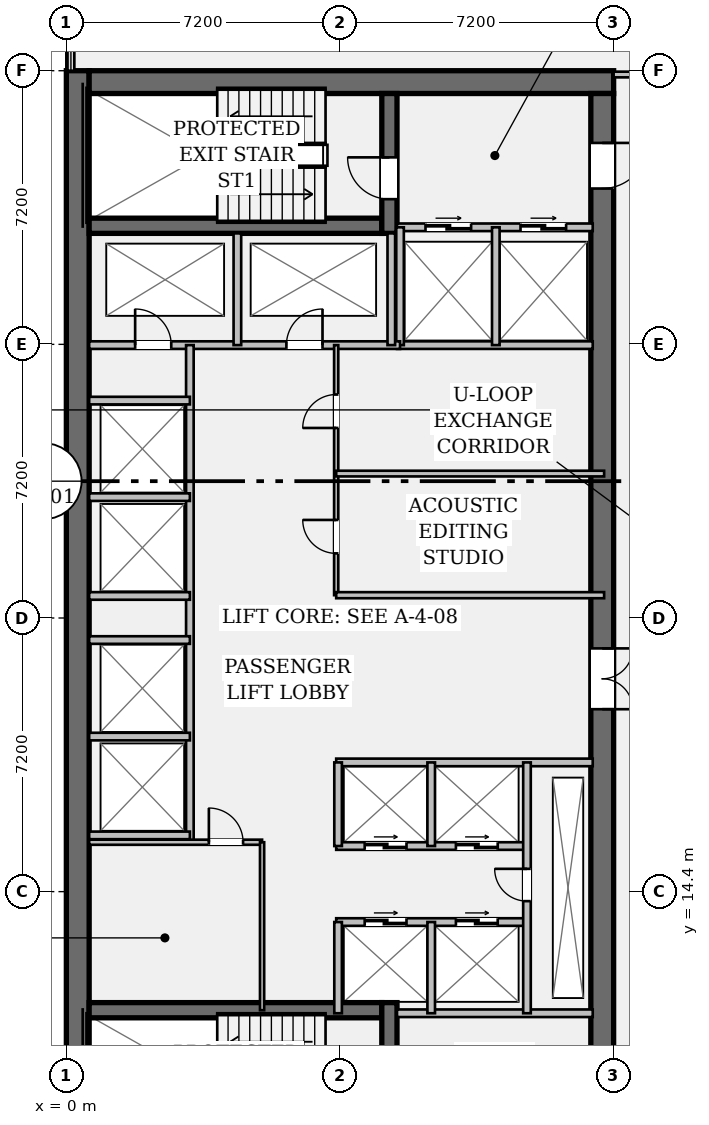
"""IFC4 building model, lengths in metres.
Left out: names, types, materials, properties, quantities, classifications, styles, units other than length and angle.
Written with IfcOpenShell. Run it as: python <this file> out.ifc"""

import sys

from ifc_helpers import new_model, si_unit, direction, frame, frame_2d, origin, place, context, subcontext, project, spatial, rectangle, extrude, element, fill, save


model = new_model("IFC4")
c1 = context("Model", 3, precision=1e-05, world=origin(), true_north=direction((0.0, 1.0)))
c2 = subcontext(c1, "Body", "Model", "MODEL_VIEW")
j1 = project(units=[si_unit("LENGTHUNIT", "METRE"), si_unit("PLANEANGLEUNIT", "RADIAN")], contexts=[c1])
p1 = place(None, origin())
s1 = spatial("IfcSite", under=j1, at=p1, CompositionType="ELEMENT")
p2 = place(p1, origin())
s2 = spatial("IfcBuilding", under=s1, at=p2, CompositionType="ELEMENT")
p3 = place(p2, frame((0.0, 0.0, 121.45)))
s3 = spatial("IfcBuildingStorey", under=s2, at=p3, CompositionType="ELEMENT", Elevation=121.45)
p4 = place(p3, frame((0.3, 7.2, 0.0), z_axis=(0.0, 0.0, 1.0), x_axis=(0.0, 1.0, 0.0)))
e1 = element("IfcWall", 1, at=p4, inside=s3, PredefinedType="SHEAR", context=c2, shape_type="SweptSolid", body=[
    extrude(rectangle(XDim=28.8, YDim=0.6, at=frame_2d((14.4, 0.0))), origin(), (0.0, 0.0, 1.0), 3.58),
])
p5 = place(p3, frame((0.6, 35.7, 0.0), z_axis=(0.0, 0.0, 1.0), x_axis=(1.0, 0.0, 0.0)))
e2 = element("IfcWall", 2, at=p5, inside=s3, PredefinedType="SHEAR", context=c2, shape_type="SweptSolid", body=[
    extrude(rectangle(XDim=13.8, YDim=0.6, at=frame_2d((6.9, 0.0))), origin(), (0.0, 0.0, 1.0), 3.58),
])
p6 = place(p3, frame((14.1, 35.4, 0.0), z_axis=(0.0, 0.0, 1.0), x_axis=(0.0, -1.0, 0.0)))
e3 = element("IfcWall", 3, at=p6, inside=s3, PredefinedType="SHEAR", context=c2, shape_type="SweptSolid", body=[
    extrude(rectangle(XDim=27.6, YDim=0.6, at=frame_2d((13.8, 0.0))), origin(), (0.0, 0.0, 1.0), 3.58),
])
p7 = place(p6, frame((1.3, 0.0, 0.0)))
e4 = element("IfcOpeningElement", 4, at=p7, cuts=e3, PredefinedType="OPENING", context=c2, shape_type="SweptSolid", body=[
    extrude(rectangle(XDim=1.2, YDim=2.15, at=frame_2d((0.6, 1.075))), frame((0.0, 0.312, 0.0), z_axis=(0.0, -1.0, 0.0), x_axis=(1.0, 0.0, 0.0)), (0.0, 0.0, 1.0), 0.624),
])
p8 = place(p6, frame((25.25, 0.0, 0.0)))
e5 = element("IfcOpeningElement", 5, at=p8, cuts=e3, PredefinedType="OPENING", context=c2, shape_type="SweptSolid", body=[
    extrude(rectangle(XDim=1.2, YDim=2.15, at=frame_2d((0.6, 1.075))), frame((0.0, 0.312, 0.0), z_axis=(0.0, -1.0, 0.0), x_axis=(1.0, 0.0, 0.0)), (0.0, 0.0, 1.0), 0.624),
])
p9 = place(p6, frame((14.6, 0.0, 0.0)))
e6 = element("IfcOpeningElement", 6, at=p9, cuts=e3, PredefinedType="OPENING", context=c2, shape_type="SweptSolid", body=[
    extrude(rectangle(XDim=1.6, YDim=2.2, at=frame_2d((0.8, 1.1))), frame((0.0, 0.312, 0.0), z_axis=(0.0, -1.0, 0.0), x_axis=(1.0, 0.0, 0.0)), (0.0, 0.0, 1.0), 0.624),
])
for number, where, z_axis, x_axis in (
    (7, (0.6, 31.92, 0.0), (0.0, 0.0, 1.0), (1.0, 0.0, 0.0)),
    (8, (0.6, 11.28, 0.0), (0.0, 0.0, 1.0), (1.0, 0.0, 0.0)),
):
    element("IfcWall", number, at=place(p3, frame(where, z_axis=z_axis, x_axis=x_axis)), inside=s3, PredefinedType="SHEAR", context=c2, shape_type="SweptSolid", body=[
        extrude(rectangle(XDim=7.7, YDim=0.4, at=frame_2d((3.85, 0.0))), origin(), (0.0, 0.0, 1.0), 3.58),
    ])
p10 = place(p3, frame((8.5, 31.72, 0.0), z_axis=(0.0, 0.0, 1.0), x_axis=(0.0, 1.0, 0.0)))
e9 = element("IfcWall", 9, at=p10, inside=s3, PredefinedType="SHEAR", context=c2, shape_type="SweptSolid", body=[
    extrude(rectangle(XDim=3.68, YDim=0.4, at=frame_2d((1.84, 0.0))), origin(), (0.0, 0.0, 1.0), 3.58),
])
p11 = place(p10, frame((0.9, 0.0, 0.0)))
e10 = element("IfcOpeningElement", 10, at=p11, cuts=e9, PredefinedType="OPENING", context=c2, shape_type="SweptSolid", body=[
    extrude(rectangle(XDim=1.1, YDim=2.15, at=frame_2d((0.55, 1.075))), frame((0.0, 0.212, 0.0), z_axis=(0.0, -1.0, 0.0), x_axis=(1.0, 0.0, 0.0)), (0.0, 0.0, 1.0), 0.424),
])
p12 = place(p3, frame((8.5, 7.8, 0.0), z_axis=(0.0, 0.0, 1.0), x_axis=(0.0, 1.0, 0.0)))
e11 = element("IfcWall", 11, at=p12, inside=s3, PredefinedType="SHEAR", context=c2, shape_type="SweptSolid", body=[
    extrude(rectangle(XDim=3.68, YDim=0.4, at=frame_2d((1.84, 0.0))), origin(), (0.0, 0.0, 1.0), 3.58),
])
p13 = place(p12, frame((0.85, 0.0, 0.0)))
e12 = element("IfcOpeningElement", 12, at=p13, cuts=e11, PredefinedType="OPENING", context=c2, shape_type="SweptSolid", body=[
    extrude(rectangle(XDim=1.1, YDim=2.15, at=frame_2d((0.55, 1.075))), frame((0.0, 0.212, 0.0), z_axis=(0.0, -1.0, 0.0), x_axis=(1.0, 0.0, 0.0)), (0.0, 0.0, 1.0), 0.424),
])
p14 = place(p3, frame((8.7, 31.88, 0.0), z_axis=(0.0, 0.0, 1.0), x_axis=(1.0, 0.0, 0.0)))
e13 = element("IfcWall", 13, at=p14, inside=s3, PredefinedType="PARTITIONING", context=c2, shape_type="SweptSolid", body=[
    extrude(rectangle(XDim=5.15, YDim=0.2, at=frame_2d((2.575, 0.0))), origin(), (0.0, 0.0, 1.0), 3.58),
])
p15 = place(p14, frame((0.75, 0.0, 0.0)))
e14 = element("IfcOpeningElement", 14, at=p15, cuts=e13, PredefinedType="OPENING", context=c2, shape_type="SweptSolid", body=[
    extrude(rectangle(XDim=1.2, YDim=2.2, at=frame_2d((0.6, 1.1))), frame((0.0, 0.112, 0.0), z_axis=(0.0, -1.0, 0.0), x_axis=(1.0, 0.0, 0.0)), (0.0, 0.0, 1.0), 0.224),
])
p16 = place(p14, frame((3.25, 0.0, 0.0)))
e15 = element("IfcOpeningElement", 15, at=p16, cuts=e13, PredefinedType="OPENING", context=c2, shape_type="SweptSolid", body=[
    extrude(rectangle(XDim=1.2, YDim=2.2, at=frame_2d((0.6, 1.1))), frame((0.0, 0.112, 0.0), z_axis=(0.0, -1.0, 0.0), x_axis=(1.0, 0.0, 0.0)), (0.0, 0.0, 1.0), 0.224),
])
for number, where, z_axis, x_axis in (
    (16, (8.7, 11.2, 0.0), (0.0, 0.0, 1.0), (1.0, 0.0, 0.0)),
    (17, (8.7, 28.78, 0.0), (0.0, 0.0, 1.0), (1.0, 0.0, 0.0)),
):
    element("IfcWall", number, at=place(p3, frame(where, z_axis=z_axis, x_axis=x_axis)), inside=s3, PredefinedType="PARTITIONING", context=c2, shape_type="SweptSolid", body=[
        extrude(rectangle(XDim=5.15, YDim=0.2, at=frame_2d((2.575, 0.0))), origin(), (0.0, 0.0, 1.0), 3.58),
    ])
for number, where, z_axis, x_axis in (
    (18, (8.78, 28.78, 0.0), (0.0, 0.0, 1.0), (0.0, 1.0, 0.0)),
    (19, (11.3, 28.78, 0.0), (0.0, 0.0, 1.0), (0.0, 1.0, 0.0)),
):
    element("IfcWall", number, at=place(p3, frame(where, z_axis=z_axis, x_axis=x_axis)), inside=s3, PredefinedType="PARTITIONING", context=c2, shape_type="SweptSolid", body=[
        extrude(rectangle(XDim=3.1, YDim=0.2, at=frame_2d((1.55, 0.0))), origin(), (0.0, 0.0, 1.0), 3.58),
    ])
p17 = place(p3, frame((0.6, 28.78, 0.0), z_axis=(0.0, 0.0, 1.0), x_axis=(1.0, 0.0, 0.0)))
e20 = element("IfcWall", 20, at=p17, inside=s3, PredefinedType="PARTITIONING", context=c2, shape_type="SweptSolid", body=[
    extrude(rectangle(XDim=8.18, YDim=0.2, at=frame_2d((4.09, 0.0))), origin(), (0.0, 0.0, 1.0), 3.58),
])
p18 = place(p17, frame((1.21, 0.0, 0.0)))
e21 = element("IfcOpeningElement", 21, at=p18, cuts=e20, PredefinedType="OPENING", context=c2, shape_type="SweptSolid", body=[
    extrude(rectangle(XDim=0.95, YDim=2.15, at=frame_2d((0.475, 1.075))), frame((0.0, 0.112, 0.0), z_axis=(0.0, -1.0, 0.0), x_axis=(1.0, 0.0, 0.0)), (0.0, 0.0, 1.0), 0.224),
])
p19 = place(p17, frame((5.19, 0.0, 0.0)))
e22 = element("IfcOpeningElement", 22, at=p19, cuts=e20, PredefinedType="OPENING", context=c2, shape_type="SweptSolid", body=[
    extrude(rectangle(XDim=0.95, YDim=2.15, at=frame_2d((0.475, 1.075))), frame((0.0, 0.112, 0.0), z_axis=(0.0, -1.0, 0.0), x_axis=(1.0, 0.0, 0.0)), (0.0, 0.0, 1.0), 0.224),
])
for number, where, z_axis, x_axis in (
    (23, (4.5, 28.78, 0.0), (0.0, 0.0, 1.0), (0.0, 1.0, 0.0)),
    (24, (8.55, 28.78, 0.0), (0.0, 0.0, 1.0), (0.0, 1.0, 0.0)),
):
    element("IfcWall", number, at=place(p3, frame(where, z_axis=z_axis, x_axis=x_axis)), inside=s3, PredefinedType="PARTITIONING", context=c2, shape_type="SweptSolid", body=[
        extrude(rectangle(XDim=2.94, YDim=0.2, at=frame_2d((1.47, 0.0))), origin(), (0.0, 0.0, 1.0), 3.58),
    ])
p20 = place(p3, frame((3.25, 15.7, 0.0), z_axis=(0.0, 0.0, 1.0), x_axis=(0.0, 1.0, 0.0)))
e25 = element("IfcWall", 25, at=p20, inside=s3, PredefinedType="PARTITIONING", context=c2, shape_type="SweptSolid", body=[
    extrude(rectangle(XDim=13.08, YDim=0.2, at=frame_2d((6.54, 0.0))), origin(), (0.0, 0.0, 1.0), 3.58),
])
for number, where, z_axis, x_axis in (
    (26, (0.6, 15.88, 0.0), (0.0, 0.0, 1.0), (1.0, 0.0, 0.0)),
    (27, (0.6, 18.48, 0.0), (0.0, 0.0, 1.0), (1.0, 0.0, 0.0)),
    (28, (0.6, 22.18, 0.0), (0.0, 0.0, 1.0), (1.0, 0.0, 0.0)),
    (29, (0.6, 24.78, 0.0), (0.0, 0.0, 1.0), (1.0, 0.0, 0.0)),
    (30, (0.6, 21.02, 0.0), (0.0, 0.0, 1.0), (1.0, 0.0, 0.0)),
    (31, (0.6, 27.32, 0.0), (0.0, 0.0, 1.0), (1.0, 0.0, 0.0)),
):
    element("IfcWall", number, at=place(p3, frame(where, z_axis=z_axis, x_axis=x_axis)), inside=s3, PredefinedType="PARTITIONING", context=c2, shape_type="SweptSolid", body=[
        extrude(rectangle(XDim=2.65, YDim=0.2, at=frame_2d((1.325, 0.0))), origin(), (0.0, 0.0, 1.0), 3.58),
    ])
p21 = place(p3, frame((7.1, 22.2, 0.0), z_axis=(0.0, 0.0, 1.0), x_axis=(0.0, 1.0, 0.0)))
e32 = element("IfcWall", 32, at=p21, inside=s3, PredefinedType="PARTITIONING", context=c2, shape_type="SweptSolid", body=[
    extrude(rectangle(XDim=6.58, YDim=0.11, at=frame_2d((3.29, 0.0))), origin(), (0.0, 0.0, 1.0), 3.58),
])
p22 = place(p21, frame((1.1, 0.0, 0.0)))
e33 = element("IfcOpeningElement", 33, at=p22, cuts=e32, PredefinedType="OPENING", context=c2, shape_type="SweptSolid", body=[
    extrude(rectangle(XDim=0.88, YDim=2.15, at=frame_2d((0.44, 1.075))), frame((0.0, 0.067, 0.0), z_axis=(0.0, -1.0, 0.0), x_axis=(1.0, 0.0, 0.0)), (0.0, 0.0, 1.0), 0.134),
])
p23 = place(p21, frame((4.4, 0.0, 0.0)))
e34 = element("IfcOpeningElement", 34, at=p23, cuts=e32, PredefinedType="OPENING", context=c2, shape_type="SweptSolid", body=[
    extrude(rectangle(XDim=0.88, YDim=2.15, at=frame_2d((0.44, 1.075))), frame((0.0, 0.067, 0.0), z_axis=(0.0, -1.0, 0.0), x_axis=(1.0, 0.0, 0.0)), (0.0, 0.0, 1.0), 0.134),
])
p24 = place(p3, frame((7.1, 22.2, 0.0), z_axis=(0.0, 0.0, 1.0), x_axis=(1.0, 0.0, 0.0)))
e35 = element("IfcWall", 35, at=p24, inside=s3, PredefinedType="PARTITIONING", context=c2, shape_type="SweptSolid", body=[
    extrude(rectangle(XDim=7.05, YDim=0.16, at=frame_2d((3.525, 0.0))), origin(), (0.0, 0.0, 1.0), 3.58),
])
p25 = place(p3, frame((7.1, 25.4, 0.0), z_axis=(0.0, 0.0, 1.0), x_axis=(1.0, 0.0, 0.0)))
e36 = element("IfcWall", 36, at=p25, inside=s3, PredefinedType="PARTITIONING", context=c2, shape_type="SweptSolid", body=[
    extrude(rectangle(XDim=7.05, YDim=0.15, at=frame_2d((3.525, 0.0))), origin(), (0.0, 0.0, 1.0), 3.58),
])
p26 = place(p3, frame((7.1, 17.8, 0.0), z_axis=(0.0, 0.0, 1.0), x_axis=(1.0, 0.0, 0.0)))
e37 = element("IfcWall", 37, at=p26, inside=s3, PredefinedType="PARTITIONING", context=c2, shape_type="SweptSolid", body=[
    extrude(rectangle(XDim=6.75, YDim=0.2, at=frame_2d((3.375, 0.0))), origin(), (0.0, 0.0, 1.0), 3.58),
])
p27 = place(p3, frame((7.1, 15.6, 0.0), z_axis=(0.0, 0.0, 1.0), x_axis=(1.0, 0.0, 0.0)))
e38 = element("IfcWall", 38, at=p27, inside=s3, PredefinedType="PARTITIONING", context=c2, shape_type="SweptSolid", body=[
    extrude(rectangle(XDim=5.02, YDim=0.2, at=frame_2d((2.51, 0.0))), origin(), (0.0, 0.0, 1.0), 3.58),
])
p28 = place(p27, frame((0.75, 0.0, 0.0)))
e39 = element("IfcOpeningElement", 39, at=p28, cuts=e38, PredefinedType="OPENING", context=c2, shape_type="SweptSolid", body=[
    extrude(rectangle(XDim=1.1, YDim=2.2, at=frame_2d((0.55, 1.1))), frame((0.0, 0.112, 0.0), z_axis=(0.0, -1.0, 0.0), x_axis=(1.0, 0.0, 0.0)), (0.0, 0.0, 1.0), 0.224),
])
p29 = place(p27, frame((3.15, 0.0, 0.0)))
e40 = element("IfcOpeningElement", 40, at=p29, cuts=e38, PredefinedType="OPENING", context=c2, shape_type="SweptSolid", body=[
    extrude(rectangle(XDim=1.1, YDim=2.2, at=frame_2d((0.55, 1.1))), frame((0.0, 0.112, 0.0), z_axis=(0.0, -1.0, 0.0), x_axis=(1.0, 0.0, 0.0)), (0.0, 0.0, 1.0), 0.224),
])
p30 = place(p3, frame((7.1, 13.6, 0.0), z_axis=(0.0, 0.0, 1.0), x_axis=(1.0, 0.0, 0.0)))
e41 = element("IfcWall", 41, at=p30, inside=s3, PredefinedType="PARTITIONING", context=c2, shape_type="SweptSolid", body=[
    extrude(rectangle(XDim=5.02, YDim=0.2, at=frame_2d((2.51, 0.0))), origin(), (0.0, 0.0, 1.0), 3.58),
])
p31 = place(p30, frame((0.75, 0.0, 0.0)))
e42 = element("IfcOpeningElement", 42, at=p31, cuts=e41, PredefinedType="OPENING", context=c2, shape_type="SweptSolid", body=[
    extrude(rectangle(XDim=1.1, YDim=2.2, at=frame_2d((0.55, 1.1))), frame((0.0, 0.112, 0.0), z_axis=(0.0, -1.0, 0.0), x_axis=(1.0, 0.0, 0.0)), (0.0, 0.0, 1.0), 0.224),
])
p32 = place(p30, frame((3.15, 0.0, 0.0)))
e43 = element("IfcOpeningElement", 43, at=p32, cuts=e41, PredefinedType="OPENING", context=c2, shape_type="SweptSolid", body=[
    extrude(rectangle(XDim=1.1, YDim=2.2, at=frame_2d((0.55, 1.1))), frame((0.0, 0.112, 0.0), z_axis=(0.0, -1.0, 0.0), x_axis=(1.0, 0.0, 0.0)), (0.0, 0.0, 1.0), 0.224),
])
p33 = place(p3, frame((7.15, 15.6, 0.0), z_axis=(0.0, 0.0, 1.0), x_axis=(0.0, 1.0, 0.0)))
e44 = element("IfcWall", 44, at=p33, inside=s3, PredefinedType="PARTITIONING", context=c2, shape_type="SweptSolid", body=[
    extrude(rectangle(XDim=2.2, YDim=0.2, at=frame_2d((1.1, 0.0))), origin(), (0.0, 0.0, 1.0), 3.58),
])
p34 = place(p3, frame((7.15, 11.2, 0.0), z_axis=(0.0, 0.0, 1.0), x_axis=(0.0, 1.0, 0.0)))
e45 = element("IfcWall", 45, at=p34, inside=s3, PredefinedType="PARTITIONING", context=c2, shape_type="SweptSolid", body=[
    extrude(rectangle(XDim=2.4, YDim=0.2, at=frame_2d((1.2, 0.0))), origin(), (0.0, 0.0, 1.0), 3.58),
])
p35 = place(p3, frame((9.6, 15.6, 0.0), z_axis=(0.0, 0.0, 1.0), x_axis=(0.0, 1.0, 0.0)))
e46 = element("IfcWall", 46, at=p35, inside=s3, PredefinedType="PARTITIONING", context=c2, shape_type="SweptSolid", body=[
    extrude(rectangle(XDim=2.2, YDim=0.2, at=frame_2d((1.1, 0.0))), origin(), (0.0, 0.0, 1.0), 3.58),
])
p36 = place(p3, frame((9.6, 11.2, 0.0), z_axis=(0.0, 0.0, 1.0), x_axis=(0.0, 1.0, 0.0)))
e47 = element("IfcWall", 47, at=p36, inside=s3, PredefinedType="PARTITIONING", context=c2, shape_type="SweptSolid", body=[
    extrude(rectangle(XDim=2.4, YDim=0.2, at=frame_2d((1.2, 0.0))), origin(), (0.0, 0.0, 1.0), 3.58),
])
p37 = place(p3, frame((12.12, 11.2, 0.0), z_axis=(0.0, 0.0, 1.0), x_axis=(0.0, 1.0, 0.0)))
e48 = element("IfcWall", 48, at=p37, inside=s3, PredefinedType="PARTITIONING", context=c2, shape_type="SweptSolid", body=[
    extrude(rectangle(XDim=6.6, YDim=0.2, at=frame_2d((3.3, 0.0))), origin(), (0.0, 0.0, 1.0), 3.58),
])
p38 = place(p37, frame((2.95, 0.0, 0.0)))
e49 = element("IfcOpeningElement", 49, at=p38, cuts=e48, PredefinedType="OPENING", context=c2, shape_type="SweptSolid", body=[
    extrude(rectangle(XDim=0.85, YDim=2.15, at=frame_2d((0.425, 1.075))), frame((0.0, 0.112, 0.0), z_axis=(0.0, -1.0, 0.0), x_axis=(1.0, 0.0, 0.0)), (0.0, 0.0, 1.0), 0.224),
])
p39 = place(p3, frame((0.6, 15.7, 0.0), z_axis=(0.0, 0.0, 1.0), x_axis=(1.0, 0.0, 0.0)))
e50 = element("IfcWall", 50, at=p39, inside=s3, PredefinedType="PARTITIONING", context=c2, shape_type="SweptSolid", body=[
    extrude(rectangle(XDim=4.55, YDim=0.135, at=frame_2d((2.275, 0.0))), origin(), (0.0, 0.0, 1.0), 3.58),
])
p40 = place(p39, frame((3.15, 0.0, 0.0)))
e51 = element("IfcOpeningElement", 51, at=p40, cuts=e50, PredefinedType="OPENING", context=c2, shape_type="SweptSolid", body=[
    extrude(rectangle(XDim=0.9, YDim=2.15, at=frame_2d((0.45, 1.075))), frame((0.0, 0.08, 0.0), z_axis=(0.0, -1.0, 0.0), x_axis=(1.0, 0.0, 0.0)), (0.0, 0.0, 1.0), 0.159),
])
p41 = place(p3, frame((5.15, 11.28, 0.0), z_axis=(0.0, 0.0, 1.0), x_axis=(0.0, 1.0, 0.0)))
e52 = element("IfcWall", 52, at=p41, inside=s3, PredefinedType="PARTITIONING", context=c2, shape_type="SweptSolid", body=[
    extrude(rectangle(XDim=4.42, YDim=0.11, at=frame_2d((2.21, 0.0))), origin(), (0.0, 0.0, 1.0), 3.58),
])
p42 = place(p3, frame((14.4, 35.9, 0.0), z_axis=(0.0, 0.0, 1.0), x_axis=(1.0, 0.0, 0.0)))
e53 = element("IfcWall", 53, at=p42, inside=s3, PredefinedType="PARTITIONING", context=c2, shape_type="SweptSolid", body=[
    extrude(rectangle(XDim=2.95, YDim=0.15, at=frame_2d((1.475, 0.0))), origin(), (0.0, 0.0, 1.0), 2.869),
])
p43 = place(p42, frame((0.95, 0.0, 0.0)))
e54 = element("IfcOpeningElement", 54, at=p43, cuts=e53, PredefinedType="OPENING", context=c2, shape_type="SweptSolid", body=[
    extrude(rectangle(XDim=1.0, YDim=2.15, at=frame_2d((0.5, 1.075))), frame((0.0, 0.087, 0.0), z_axis=(0.0, -1.0, 0.0), x_axis=(1.0, 0.0, 0.0)), (0.0, 0.0, 1.0), 0.174),
])
p44 = place(p11, origin())
e55 = element("IfcDoor", 55, at=p44, inside=s3, OperationType="SINGLE_SWING_RIGHT", PredefinedType="DOOR", context=c2, shape_type="SweptSolid", body=[
    extrude(rectangle(XDim=1.1, YDim=2.15, at=frame_2d((0.55, 1.075))), frame((0.0, 0.025, 0.0), z_axis=(0.0, -1.0, 0.0), x_axis=(1.0, 0.0, 0.0)), (0.0, 0.0, 1.0), 0.05),
])
fill(e10, e55)
p45 = place(p7, origin())
e56 = element("IfcDoor", 56, at=p45, inside=s3, OperationType="SINGLE_SWING_LEFT", PredefinedType="DOOR", context=c2, shape_type="SweptSolid", body=[
    extrude(rectangle(XDim=1.2, YDim=2.15, at=frame_2d((0.6, 1.075))), frame((0.0, 0.025, 0.0), z_axis=(0.0, -1.0, 0.0), x_axis=(1.0, 0.0, 0.0)), (0.0, 0.0, 1.0), 0.05),
])
fill(e4, e56)
p46 = place(p15, origin())
e57 = element("IfcDoor", 57, at=p46, inside=s3, OperationType="DOUBLE_DOOR_SLIDING", PredefinedType="DOOR", context=c2, shape_type="SweptSolid", body=[
    extrude(rectangle(XDim=1.2, YDim=2.2, at=frame_2d((0.6, 1.1))), frame((0.0, 0.025, 0.0), z_axis=(0.0, -1.0, 0.0), x_axis=(1.0, 0.0, 0.0)), (0.0, 0.0, 1.0), 0.05),
])
fill(e14, e57)
p47 = place(p16, origin())
e58 = element("IfcDoor", 58, at=p47, inside=s3, OperationType="DOUBLE_DOOR_SLIDING", PredefinedType="DOOR", context=c2, shape_type="SweptSolid", body=[
    extrude(rectangle(XDim=1.2, YDim=2.2, at=frame_2d((0.6, 1.1))), frame((0.0, 0.025, 0.0), z_axis=(0.0, -1.0, 0.0), x_axis=(1.0, 0.0, 0.0)), (0.0, 0.0, 1.0), 0.05),
])
fill(e15, e58)
p48 = place(p18, origin())
e59 = element("IfcDoor", 59, at=p48, inside=s3, OperationType="SINGLE_SWING_LEFT", PredefinedType="DOOR", context=c2, shape_type="SweptSolid", body=[
    extrude(rectangle(XDim=0.95, YDim=2.15, at=frame_2d((0.475, 1.075))), frame((0.0, 0.025, 0.0), z_axis=(0.0, -1.0, 0.0), x_axis=(1.0, 0.0, 0.0)), (0.0, 0.0, 1.0), 0.05),
])
fill(e21, e59)
p49 = place(p19, origin())
e60 = element("IfcDoor", 60, at=p49, inside=s3, OperationType="SINGLE_SWING_RIGHT", PredefinedType="DOOR", context=c2, shape_type="SweptSolid", body=[
    extrude(rectangle(XDim=0.95, YDim=2.15, at=frame_2d((0.475, 1.075))), frame((0.0, 0.025, 0.0), z_axis=(0.0, -1.0, 0.0), x_axis=(1.0, 0.0, 0.0)), (0.0, 0.0, 1.0), 0.05),
])
fill(e22, e60)
p50 = place(p9, origin())
e61 = element("IfcDoor", 61, at=p50, inside=s3, OperationType="DOUBLE_DOOR_SINGLE_SWING", PredefinedType="DOOR", context=c2, shape_type="SweptSolid", body=[
    extrude(rectangle(XDim=1.6, YDim=2.2, at=frame_2d((0.8, 1.1))), frame((0.0, 0.025, 0.0), z_axis=(0.0, -1.0, 0.0), x_axis=(1.0, 0.0, 0.0)), (0.0, 0.0, 1.0), 0.05),
])
fill(e6, e61)
p51 = place(p22, origin())
e62 = element("IfcDoor", 62, at=p51, inside=s3, OperationType="SINGLE_SWING_RIGHT", PredefinedType="DOOR", context=c2, shape_type="SweptSolid", body=[
    extrude(rectangle(XDim=0.88, YDim=2.15, at=frame_2d((0.44, 1.075))), frame((0.0, 0.025, 0.0), z_axis=(0.0, -1.0, 0.0), x_axis=(1.0, 0.0, 0.0)), (0.0, 0.0, 1.0), 0.05),
])
fill(e33, e62)
p52 = place(p23, origin())
e63 = element("IfcDoor", 63, at=p52, inside=s3, OperationType="SINGLE_SWING_LEFT", PredefinedType="DOOR", context=c2, shape_type="SweptSolid", body=[
    extrude(rectangle(XDim=0.88, YDim=2.15, at=frame_2d((0.44, 1.075))), frame((0.0, 0.025, 0.0), z_axis=(0.0, -1.0, 0.0), x_axis=(1.0, 0.0, 0.0)), (0.0, 0.0, 1.0), 0.05),
])
fill(e34, e63)
p53 = place(p38, origin())
e64 = element("IfcDoor", 64, at=p53, inside=s3, OperationType="SINGLE_SWING_RIGHT", PredefinedType="DOOR", context=c2, shape_type="SweptSolid", body=[
    extrude(rectangle(XDim=0.85, YDim=2.15, at=frame_2d((0.425, 1.075))), frame((0.0, 0.025, 0.0), z_axis=(0.0, -1.0, 0.0), x_axis=(1.0, 0.0, 0.0)), (0.0, 0.0, 1.0), 0.05),
])
fill(e49, e64)
p54 = place(p28, origin())
e65 = element("IfcDoor", 65, at=p54, inside=s3, OperationType="DOUBLE_DOOR_SLIDING", PredefinedType="DOOR", context=c2, shape_type="SweptSolid", body=[
    extrude(rectangle(XDim=1.1, YDim=2.2, at=frame_2d((0.55, 1.1))), frame((0.0, 0.025, 0.0), z_axis=(0.0, -1.0, 0.0), x_axis=(1.0, 0.0, 0.0)), (0.0, 0.0, 1.0), 0.05),
])
fill(e39, e65)
p55 = place(p29, origin())
e66 = element("IfcDoor", 66, at=p55, inside=s3, OperationType="DOUBLE_DOOR_SLIDING", PredefinedType="DOOR", context=c2, shape_type="SweptSolid", body=[
    extrude(rectangle(XDim=1.1, YDim=2.2, at=frame_2d((0.55, 1.1))), frame((0.0, 0.025, 0.0), z_axis=(0.0, -1.0, 0.0), x_axis=(1.0, 0.0, 0.0)), (0.0, 0.0, 1.0), 0.05),
])
fill(e40, e66)
p56 = place(p31, origin())
e67 = element("IfcDoor", 67, at=p56, inside=s3, OperationType="DOUBLE_DOOR_SLIDING", PredefinedType="DOOR", context=c2, shape_type="SweptSolid", body=[
    extrude(rectangle(XDim=1.1, YDim=2.2, at=frame_2d((0.55, 1.1))), frame((0.0, 0.025, 0.0), z_axis=(0.0, -1.0, 0.0), x_axis=(1.0, 0.0, 0.0)), (0.0, 0.0, 1.0), 0.05),
])
fill(e42, e67)
p57 = place(p32, origin())
e68 = element("IfcDoor", 68, at=p57, inside=s3, OperationType="DOUBLE_DOOR_SLIDING", PredefinedType="DOOR", context=c2, shape_type="SweptSolid", body=[
    extrude(rectangle(XDim=1.1, YDim=2.2, at=frame_2d((0.55, 1.1))), frame((0.0, 0.025, 0.0), z_axis=(0.0, -1.0, 0.0), x_axis=(1.0, 0.0, 0.0)), (0.0, 0.0, 1.0), 0.05),
])
fill(e43, e68)
p58 = place(p40, origin())
e69 = element("IfcDoor", 69, at=p58, inside=s3, OperationType="SINGLE_SWING_LEFT", PredefinedType="DOOR", context=c2, shape_type="SweptSolid", body=[
    extrude(rectangle(XDim=0.9, YDim=2.15, at=frame_2d((0.45, 1.075))), frame((0.0, 0.025, 0.0), z_axis=(0.0, -1.0, 0.0), x_axis=(1.0, 0.0, 0.0)), (0.0, 0.0, 1.0), 0.05),
])
fill(e51, e69)
save(model, sys.argv[1])
